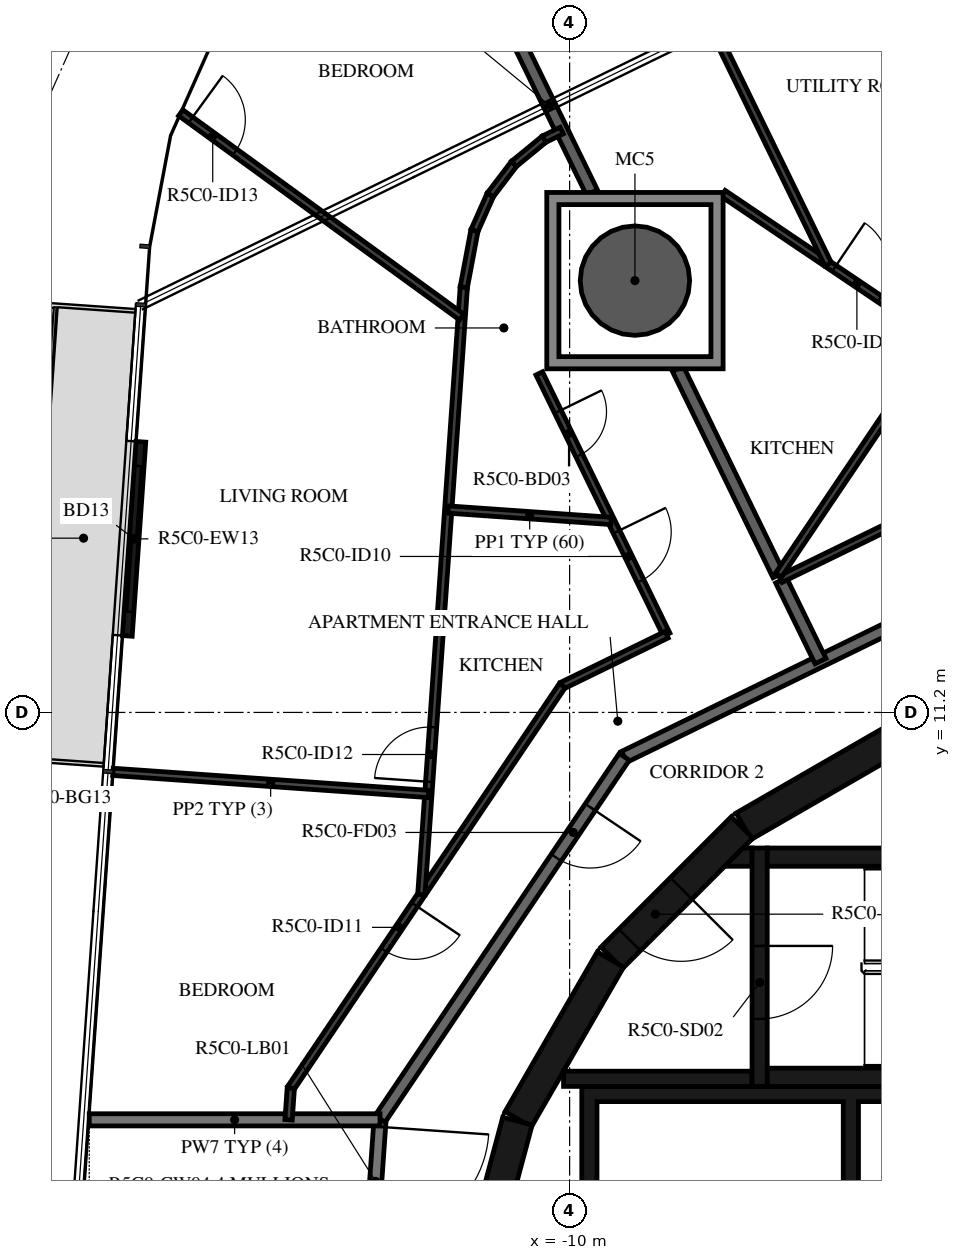
"""IFC4 building model, lengths in metres.
Left out: names, types, materials, properties, quantities, classifications, styles, units other than length and angle.
Written with IfcOpenShell. Run it as: python <this file> out.ifc"""

import sys

from ifc_helpers import new_model, si_unit, direction, frame, frame_2d, origin, origin_2d, place, context, subcontext, project, spatial, polyline, rectangle, hollow_circle, outline, extrude, element, fill, save


model = new_model("IFC4")
c1 = context("Model", 3, precision=1e-05, world=origin(), true_north=direction((0.0, 1.0)))
c2 = subcontext(c1, "Body", "Model", "MODEL_VIEW")
j1 = project(units=[si_unit("LENGTHUNIT", "METRE"), si_unit("PLANEANGLEUNIT", "RADIAN")], contexts=[c1])
p1 = place(None, origin())
s1 = spatial("IfcSite", under=j1, at=p1, CompositionType="ELEMENT")
p2 = place(p1, origin())
s2 = spatial("IfcBuilding", under=s1, at=p2, CompositionType="ELEMENT")
p3 = place(p2, frame((0.0, 0.0, 209.4)))
s3 = spatial("IfcBuildingStorey", under=s2, at=p3, CompositionType="ELEMENT", Elevation=209.4)
p4 = place(p3, frame((-8.926, 18.301, -0.38), z_axis=(0.0, 0.0, 1.0), x_axis=(1.0, 0.0, 0.0)))
e1 = element("IfcColumn", 1, at=p4, inside=s3, PredefinedType="COLUMN", context=c2, shape_type="SweptSolid", body=[
    extrude(hollow_circle(Radius=0.9, WallThickness=0.04, at=origin_2d()), origin(), (0.0, 0.0, 1.0), 3.5),
])
p5 = place(p3, frame((-17.051, 15.65, 0.0), z_axis=(0.0, 0.0, 1.0), x_axis=(-0.069734222855, -0.997565605944, 0.0)))
e2 = element("IfcWall", 2, at=p5, inside=s3, PredefinedType="STANDARD", context=c2, shape_type="SweptSolid", body=[
    extrude(rectangle(XDim=3.2, YDim=0.16, at=frame_2d((1.6, 0.0))), origin(), (0.0, 0.0, 1.0), 3.12),
])
p6 = place(p5, frame((0.4, 0.0, 0.0)))
e3 = element("IfcOpeningElement", 3, at=p6, cuts=e2, PredefinedType="OPENING", context=c2, shape_type="SweptSolid", body=[
    extrude(rectangle(XDim=2.4, YDim=2.4, at=frame_2d((1.2, 1.2))), frame((0.0, 0.09, 0.0), z_axis=(0.0, -1.0, 0.0), x_axis=(1.0, 0.0, 0.0)), (0.0, 0.0, 1.0), 0.18),
])
p7 = place(p3, frame((-4.51, 10.845, 0.0), z_axis=(0.0, 0.0, 1.0), x_axis=(-0.865975092491, -0.500087131594, 0.0)))
e4 = element("IfcWall", 4, at=p7, inside=s3, PredefinedType="SHEAR", context=c2, shape_type="SweptSolid", body=[
    extrude(rectangle(XDim=3.033, YDim=0.5, at=frame_2d((1.516, 0.0))), origin(), (0.0, 0.0, 1.0), 3.12),
])
p8 = place(p3, frame((-7.164, 9.308, 0.0), z_axis=(0.0, 0.0, 1.0), x_axis=(-0.707106781187, -0.707106781187, 0.0)))
e5 = element("IfcWall", 5, at=p8, inside=s3, PredefinedType="SHEAR", context=c2, shape_type="SweptSolid", body=[
    extrude(rectangle(XDim=3.032, YDim=0.5, at=frame_2d((1.516, 0.0))), origin(), (0.0, 0.0, 1.0), 3.12),
])
p9 = place(p8, frame((1.416, 0.0, 0.0)))
e6 = element("IfcOpeningElement", 6, at=p9, cuts=e5, PredefinedType="OPENING", context=c2, shape_type="SweptSolid", body=[
    extrude(rectangle(XDim=1.2, YDim=2.1, at=frame_2d((0.6, 1.05))), frame((0.0, 0.26, 0.0), z_axis=(0.0, -1.0, 0.0), x_axis=(1.0, 0.0, 0.0)), (0.0, 0.0, 1.0), 0.52),
])
for number, where, z_axis, x_axis in (
    (7, (-9.329, 7.137, 0.0), (0.0, 0.0, 1.0), (-0.5, -0.866, 0.0)),
    (8, (-10.858, 4.479, 0.0), (0.0, 0.0, 1.0), (-0.259, -0.966, 0.0)),
):
    element("IfcWall", number, at=place(p3, frame(where, z_axis=z_axis, x_axis=x_axis)), inside=s3, PredefinedType="SHEAR", context=c2, shape_type="SweptSolid", body=[
        extrude(rectangle(XDim=3.033, YDim=0.5, at=frame_2d((1.516, 0.0))), origin(), (0.0, 0.0, 1.0), 3.12),
    ])
for number, where, z_axis, x_axis in (
    (9, (-6.75, 5.2, 0.0), (0.0, 0.0, 1.0), (1.0, 0.0, 0.0)),
    (10, (-6.75, 8.82, 0.0), (0.0, 0.0, 1.0), (1.0, 0.0, 0.0)),
):
    element("IfcWall", number, at=place(p3, frame(where, z_axis=z_axis, x_axis=x_axis)), inside=s3, PredefinedType="SHEAR", context=c2, shape_type="SweptSolid", body=[
        extrude(rectangle(XDim=6.75, YDim=0.3, at=frame_2d((3.375, 0.0))), origin(), (0.0, 0.0, 1.0), 3.12),
    ])
p10 = place(p3, frame((-6.875, 8.97, 0.0), z_axis=(0.0, 0.0, 1.0), x_axis=(0.0, -1.0, 0.0)))
e11 = element("IfcWall", 11, at=p10, inside=s3, PredefinedType="SHEAR", context=c2, shape_type="SweptSolid", body=[
    extrude(rectangle(XDim=3.92, YDim=0.25, at=frame_2d((1.96, 0.0))), origin(), (0.0, 0.0, 1.0), 3.12),
])
p11 = place(p10, frame((1.61, 0.0, 0.0)))
e12 = element("IfcOpeningElement", 12, at=p11, cuts=e11, PredefinedType="OPENING", context=c2, shape_type="SweptSolid", body=[
    extrude(rectangle(XDim=1.2, YDim=2.1, at=frame_2d((0.6, 1.05))), frame((0.0, 0.135, 0.0), z_axis=(0.0, -1.0, 0.0), x_axis=(1.0, 0.0, 0.0)), (0.0, 0.0, 1.0), 0.27),
])
p12 = place(p3, frame((-7.0, 5.175, 0.0), z_axis=(0.0, 0.0, 1.0), x_axis=(-1.0, 0.0, 0.0)))
e13 = element("IfcWall", 13, at=p12, inside=s3, PredefinedType="SHEAR", context=c2, shape_type="SweptSolid", body=[
    extrude(rectangle(XDim=3.1, YDim=0.25, at=frame_2d((1.55, 0.0))), origin(), (0.0, 0.0, 1.0), 3.12),
])
p13 = place(p3, origin())
e14 = element("IfcWall", 14, at=p13, inside=s3, PredefinedType="SHEAR", context=c2, shape_type="SweptSolid", body=[
    extrude(outline(polyline([(-7.148, 8.97), (-7.0, 8.97), (-7.0, 8.67), (-7.448, 8.67), (-7.148, 8.97)])), origin(), (0.0, 0.0, 1.0), 3.12),
])
p14 = place(p3, origin())
e15 = element("IfcWall", 15, at=p14, inside=s3, PredefinedType="SHEAR", context=c2, shape_type="SweptSolid", body=[
    extrude(outline(polyline([(-9.55, 4.8), (-5.5, 4.8), (-5.5, 1.9), (-5.25, 1.9), (-5.25, 4.8), (-1.2, 4.8), (-1.2, 1.9), (-0.95, 1.9), (-0.95, 4.8), (0.95, 4.8), (0.95, 1.9), (1.2, 1.9), (1.2, 4.8), (3.1, 4.8), (3.1, 1.9), (3.35, 1.9), (3.35, 4.8), (5.25, 4.8), (5.25, 1.9), (5.5, 1.9), (5.5, 4.8), (7.4, 4.8), (7.4, 1.9), (7.65, 1.9), (7.65, 4.8), (9.55, 4.8), (9.55, 1.9), (9.8, 1.9), (9.8, 4.8), (9.8, 5.05), (-9.8, 5.05), (-9.8, 4.8), (-9.8, 1.9), (-9.55, 1.9), (-9.55, 4.8)])), origin(), (0.0, 0.0, 1.0), 3.12),
])
p15 = place(p3, frame((-13.118, 4.5, 0.0), z_axis=(0.0, 0.0, 1.0), x_axis=(-0.069746872611, -0.99756472159, 0.0)))
e16 = element("IfcWall", 16, at=p15, inside=s3, PredefinedType="STANDARD", context=c2, shape_type="SweptSolid", body=[
    extrude(rectangle(XDim=3.574, YDim=0.2, at=frame_2d((1.787, 0.0))), origin(), (0.0, 0.0, 1.0), 3.12),
])
p16 = place(p15, frame((0.115, 0.0, 0.0)))
e17 = element("IfcOpeningElement", 17, at=p16, cuts=e16, PredefinedType="OPENING", context=c2, shape_type="SweptSolid", body=[
    extrude(rectangle(XDim=1.8, YDim=2.1, at=frame_2d((0.9, 1.05))), frame((0.0, 0.11, 0.0), z_axis=(0.0, -1.0, 0.0), x_axis=(1.0, 0.0, 0.0)), (0.0, 0.0, 1.0), 0.22),
])
p17 = place(p3, frame((-2.647, 13.618, 0.0), z_axis=(0.0, 0.0, 1.0), x_axis=(-0.898796543751, -0.438366026218, 0.0)))
e18 = element("IfcWall", 18, at=p17, inside=s3, PredefinedType="STANDARD", context=c2, shape_type="SweptSolid", body=[
    extrude(rectangle(XDim=7.181, YDim=0.2, at=frame_2d((3.591, 0.0))), origin(), (0.0, 0.0, 1.0), 3.12),
])
p18 = place(p3, frame((-9.101, 10.47, 0.0), z_axis=(0.0, 0.0, 1.0), x_axis=(-0.559195469534, -0.829035841718, 0.0)))
e19 = element("IfcWall", 19, at=p18, inside=s3, PredefinedType="STANDARD", context=c2, shape_type="SweptSolid", body=[
    extrude(rectangle(XDim=7.181, YDim=0.2, at=frame_2d((3.591, 0.0))), origin(), (0.0, 0.0, 1.0), 3.12),
])
p19 = place(p18, frame((1.0, 0.0, 0.0)))
e20 = element("IfcOpeningElement", 20, at=p19, cuts=e19, PredefinedType="OPENING", context=c2, shape_type="SweptSolid", body=[
    extrude(rectangle(XDim=1.0, YDim=2.1, at=frame_2d((0.5, 1.05))), frame((0.0, 0.11, 0.0), z_axis=(0.0, -1.0, 0.0), x_axis=(1.0, 0.0, 0.0)), (0.0, 0.0, 1.0), 0.22),
])
p20 = place(p3, frame((-13.118, 4.5, 0.0), z_axis=(0.0, 0.0, 1.0), x_axis=(-1.0, 0.0, 0.0)))
e21 = element("IfcWall", 21, at=p20, inside=s3, PredefinedType="STANDARD", context=c2, shape_type="SweptSolid", body=[
    extrude(rectangle(XDim=4.782, YDim=0.2, at=frame_2d((2.391, 0.0))), origin(), (0.0, 0.0, 1.0), 3.12),
])
p21 = place(p3, frame((-6.522, 13.373, 0.0), z_axis=(0.0, 0.0, 1.0), x_axis=(0.438277270821, -0.8988398266, 0.0)))
e22 = element("IfcWall", 22, at=p21, inside=s3, PredefinedType="STANDARD", context=c2, shape_type="SweptSolid", body=[
    extrude(rectangle(XDim=1.479, YDim=0.2, at=frame_2d((0.74, 0.0))), origin(), (0.0, 0.0, 1.0), 3.12),
])
p22 = place(p3, frame((-8.219, 16.851, 0.0), z_axis=(0.0, 0.0, 1.0), x_axis=(0.438291091101, -0.898833087654, 0.0)))
e23 = element("IfcWall", 23, at=p22, inside=s3, PredefinedType="STANDARD", context=c2, shape_type="SweptSolid", body=[
    extrude(rectangle(XDim=3.774, YDim=0.2, at=frame_2d((1.887, 0.0))), origin(), (0.0, 0.0, 1.0), 3.12),
])
p23 = place(p3, frame((-12.409, 25.442, 0.0), z_axis=(0.0, 0.0, 1.0), x_axis=(0.43838641251, -0.898786600549, 0.0)))
e24 = element("IfcWall", 24, at=p23, inside=s3, PredefinedType="STANDARD", context=c2, shape_type="SweptSolid", body=[
    extrude(rectangle(XDim=6.333, YDim=0.2, at=frame_2d((3.166, 0.0))), origin(), (0.0, 0.0, 1.0), 3.12),
])
p24 = place(p3, frame((-2.943, 15.142, 0.0), z_axis=(0.0, 0.0, 1.0), x_axis=(-0.89881075705, -0.438336883014, 0.0)))
e25 = element("IfcWall", 25, at=p24, inside=s3, PredefinedType="PARTITIONING", context=c2, shape_type="SweptSolid", body=[
    extrude(rectangle(XDim=3.992, YDim=0.12, at=frame_2d((1.996, 0.0))), origin(), (0.0, 0.0, 1.0), 3.12),
])
p25 = place(p3, frame((-7.476, 19.735, 0.0), z_axis=(0.0, 0.0, 1.0), x_axis=(0.829035412992, -0.559196105142, 0.0)))
e26 = element("IfcWall", 26, at=p25, inside=s3, PredefinedType="PARTITIONING", context=c2, shape_type="SweptSolid", body=[
    extrude(rectangle(XDim=8.531, YDim=0.12, at=frame_2d((4.266, 0.0))), origin(), (0.0, 0.0, 1.0), 3.12),
])
p26 = place(p25, frame((2.204, 0.0, 0.0)))
e27 = element("IfcOpeningElement", 27, at=p26, cuts=e26, PredefinedType="OPENING", context=c2, shape_type="SweptSolid", body=[
    extrude(rectangle(XDim=0.9, YDim=2.1, at=frame_2d((0.45, 1.05))), frame((0.0, 0.07, 0.0), z_axis=(0.0, -1.0, 0.0), x_axis=(1.0, 0.0, 0.0)), (0.0, 0.0, 1.0), 0.14),
])
p27 = place(p3, frame((-3.939, 17.35, 0.0), z_axis=(0.0, 0.0, 1.0), x_axis=(-0.559193216274, -0.829037361566, 0.0)))
e28 = element("IfcWall", 28, at=p27, inside=s3, PredefinedType="PARTITIONING", context=c2, shape_type="SweptSolid", body=[
    extrude(rectangle(XDim=4.694, YDim=0.12, at=frame_2d((2.347, 0.0))), origin(), (0.0, 0.0, 1.0), 3.12),
])
p28 = place(p3, frame((-9.496, 26.254, 0.0), z_axis=(0.0, 0.0, 1.0), x_axis=(0.438361739807, -0.89879863433, 0.0)))
e29 = element("IfcWall", 29, at=p28, inside=s3, PredefinedType="PARTITIONING", context=c2, shape_type="SweptSolid", body=[
    extrude(rectangle(XDim=8.549, YDim=0.12, at=frame_2d((4.274, 0.0))), origin(), (0.0, 0.0, 1.0), 3.12),
])
p29 = place(p28, frame((0.4, 0.0, 0.0)))
e30 = element("IfcOpeningElement", 30, at=p29, cuts=e29, PredefinedType="OPENING", context=c2, shape_type="SweptSolid", body=[
    extrude(rectangle(XDim=0.9, YDim=2.1, at=frame_2d((0.45, 1.05))), frame((0.0, 0.07, 0.0), z_axis=(0.0, -1.0, 0.0), x_axis=(1.0, 0.0, 0.0)), (0.0, 0.0, 1.0), 0.14),
])
p30 = place(p3, frame((-10.5, 16.775, 0.0), z_axis=(0.0, 0.0, 1.0), x_axis=(0.438345136783, -0.898806731761, 0.0)))
e31 = element("IfcWall", 31, at=p30, inside=s3, PredefinedType="PARTITIONING", context=c2, shape_type="SweptSolid", body=[
    extrude(rectangle(XDim=4.78, YDim=0.12, at=frame_2d((2.39, 0.0))), origin(), (0.0, 0.0, 1.0), 3.12),
])
p31 = place(p30, frame((0.7, 0.0, 0.0)))
e32 = element("IfcOpeningElement", 32, at=p31, cuts=e31, PredefinedType="OPENING", context=c2, shape_type="SweptSolid", body=[
    extrude(rectangle(XDim=0.8, YDim=2.1, at=frame_2d((0.4, 1.05))), frame((0.0, 0.07, 0.0), z_axis=(0.0, -1.0, 0.0), x_axis=(1.0, 0.0, 0.0)), (0.0, 0.0, 1.0), 0.14),
])
p32 = place(p30, frame((2.899, 0.0, 0.0)))
e33 = element("IfcOpeningElement", 33, at=p32, cuts=e31, PredefinedType="OPENING", context=c2, shape_type="SweptSolid", body=[
    extrude(rectangle(XDim=0.9, YDim=2.1, at=frame_2d((0.45, 1.05))), frame((0.0, 0.07, 0.0), z_axis=(0.0, -1.0, 0.0), x_axis=(1.0, 0.0, 0.0)), (0.0, 0.0, 1.0), 0.14),
])
p33 = place(p3, frame((-8.405, 12.479, 0.0), z_axis=(0.0, 0.0, 1.0), x_axis=(-0.898784427692, -0.438390867307, 0.0)))
e34 = element("IfcWall", 34, at=p33, inside=s3, PredefinedType="PARTITIONING", context=c2, shape_type="SweptSolid", body=[
    extrude(rectangle(XDim=1.908, YDim=0.12, at=frame_2d((0.954, 0.0))), origin(), (0.0, 0.0, 1.0), 3.12),
])
p34 = place(p3, frame((-10.12, 11.642, 0.0), z_axis=(0.0, 0.0, 1.0), x_axis=(-0.55920080659, -0.829032241779, 0.0)))
e35 = element("IfcWall", 35, at=p34, inside=s3, PredefinedType="PARTITIONING", context=c2, shape_type="SweptSolid", body=[
    extrude(rectangle(XDim=7.985, YDim=0.12, at=frame_2d((3.992, 0.0))), origin(), (0.0, 0.0, 1.0), 3.12),
])
p35 = place(p34, frame((4.346, 0.0, 0.0)))
e36 = element("IfcOpeningElement", 36, at=p35, cuts=e35, PredefinedType="OPENING", context=c2, shape_type="SweptSolid", body=[
    extrude(rectangle(XDim=0.9, YDim=2.1, at=frame_2d((0.45, 1.05))), frame((0.0, 0.07, 0.0), z_axis=(0.0, -1.0, 0.0), x_axis=(1.0, 0.0, 0.0)), (0.0, 0.0, 1.0), 0.14),
])
p36 = place(p3, frame((-14.585, 5.022, 0.0), z_axis=(0.0, 0.0, 1.0), x_axis=(-0.069490327804, -0.997582625321, 0.0)))
e37 = element("IfcWall", 37, at=p36, inside=s3, PredefinedType="PARTITIONING", context=c2, shape_type="SweptSolid", body=[
    extrude(rectangle(XDim=0.523, YDim=0.12, at=frame_2d((0.262, 0.0))), origin(), (0.0, 0.0, 1.0), 3.12),
])
p37 = place(p3, frame((-12.439, 8.204, 0.0), z_axis=(0.0, 0.0, 1.0), x_axis=(0.069750037523, 0.997564500303, 0.0)))
e38 = element("IfcWall", 38, at=p37, inside=s3, PredefinedType="PARTITIONING", context=c2, shape_type="SweptSolid", body=[
    extrude(rectangle(XDim=10.014, YDim=0.12, at=frame_2d((5.007, 0.0))), origin(), (0.0, 0.0, 1.0), 3.12),
])
p38 = place(p37, frame((1.859, 0.0, 0.0)))
e39 = element("IfcOpeningElement", 39, at=p38, cuts=e38, PredefinedType="OPENING", context=c2, shape_type="SweptSolid", body=[
    extrude(rectangle(XDim=0.9, YDim=2.1, at=frame_2d((0.45, 1.05))), frame((0.0, 0.07, 0.0), z_axis=(0.0, -1.0, 0.0), x_axis=(1.0, 0.0, 0.0)), (0.0, 0.0, 1.0), 0.14),
])
p39 = place(p3, frame((-11.74, 18.194, 0.0), z_axis=(0.0, 0.0, 1.0), x_axis=(0.185144760846, 0.982711258474, 0.0)))
e40 = element("IfcWall", 40, at=p39, inside=s3, PredefinedType="PARTITIONING", context=c2, shape_type="SweptSolid", body=[
    extrude(rectangle(XDim=0.947, YDim=0.12, at=frame_2d((0.473, 0.0))), origin(), (0.0, 0.0, 1.0), 3.12),
])
for number, where, z_axis, x_axis in (
    (41, (-11.565, 19.125, 0.0), (0.0, 0.0, 1.0), (0.407, 0.914, 0.0)),
    (42, (-11.304, 19.711, 0.0), (0.0, 0.0, 1.0), (0.607, 0.795, 0.0)),
    (43, (-10.915, 20.221, 0.0), (0.0, 0.0, 1.0), (0.773, 0.634, 0.0)),
):
    element("IfcWall", number, at=place(p3, frame(where, z_axis=z_axis, x_axis=x_axis)), inside=s3, PredefinedType="PARTITIONING", context=c2, shape_type="SweptSolid", body=[
        extrude(rectangle(XDim=0.642, YDim=0.12, at=frame_2d((0.321, 0.0))), origin(), (0.0, 0.0, 1.0), 3.12),
    ])
p40 = place(p3, frame((-10.418, 20.628, 0.0), z_axis=(0.0, 0.0, 1.0), x_axis=(0.898943795765, 0.438063981692, 0.0)))
e44 = element("IfcWall", 44, at=p40, inside=s3, PredefinedType="PARTITIONING", context=c2, shape_type="SweptSolid", body=[
    extrude(rectangle(XDim=0.321, YDim=0.12, at=frame_2d((0.161, 0.0))), origin(), (0.0, 0.0, 1.0), 3.12),
])
p41 = place(p3, frame((-16.395, 21.061, 0.0), z_axis=(0.0, 0.0, 1.0), x_axis=(0.808810002497, -0.58807004673, 0.0)))
e45 = element("IfcWall", 45, at=p41, inside=s3, PredefinedType="PARTITIONING", context=c2, shape_type="SweptSolid", body=[
    extrude(rectangle(XDim=5.713, YDim=0.12, at=frame_2d((2.856, 0.0))), origin(), (0.0, 0.0, 1.0), 3.12),
])
p42 = place(p41, frame((0.2, 0.0, 0.0)))
e46 = element("IfcOpeningElement", 46, at=p42, cuts=e45, PredefinedType="OPENING", context=c2, shape_type="SweptSolid", body=[
    extrude(rectangle(XDim=0.9, YDim=2.1, at=frame_2d((0.45, 1.05))), frame((0.0, 0.07, 0.0), z_axis=(0.0, -1.0, 0.0), x_axis=(1.0, 0.0, 0.0)), (0.0, 0.0, 1.0), 0.14),
])
p43 = place(p3, frame((-11.996, 14.536, 0.0), z_axis=(0.0, 0.0, 1.0), x_axis=(0.997565991425, -0.069728708231, 0.0)))
e47 = element("IfcWall", 47, at=p43, inside=s3, PredefinedType="PARTITIONING", context=c2, shape_type="SweptSolid", body=[
    extrude(rectangle(XDim=2.686, YDim=0.12, at=frame_2d((1.343, 0.0))), origin(), (0.0, 0.0, 1.0), 3.12),
])
p44 = place(p3, frame((-17.51, 10.222, 0.0), z_axis=(0.0, 0.0, 1.0), x_axis=(0.997563184303, -0.069768856397, 0.0)))
e48 = element("IfcWall", 48, at=p44, inside=s3, PredefinedType="PARTITIONING", context=c2, shape_type="SweptSolid", body=[
    extrude(rectangle(XDim=5.2, YDim=0.12, at=frame_2d((2.6, 0.0))), origin(), (0.0, 0.0, 1.0), 2.73),
])
p45 = place(p3, origin())
e49 = element("IfcWall", 49, at=p45, inside=s3, PredefinedType="STANDARD", context=c2, shape_type="SweptSolid", body=[
    extrude(outline(polyline([(-7.476, 19.751), (-7.476, 16.851), (-10.376, 16.851), (-10.376, 19.751), (-7.476, 19.751)]), holes=[polyline([(-10.176, 17.051), (-7.676, 17.051), (-7.676, 19.551), (-10.176, 19.551), (-10.176, 17.051)])]), origin(), (0.0, 0.0, 1.0), 3.12),
])
p46 = place(p6, origin())
e50 = element("IfcDoor", 50, at=p46, inside=s3, OperationType="DOUBLE_DOOR_SLIDING", PredefinedType="DOOR", context=c2, shape_type="SweptSolid", body=[
    extrude(rectangle(XDim=2.4, YDim=2.4, at=frame_2d((1.2, 1.2))), frame((0.0, 0.025, 0.0), z_axis=(0.0, -1.0, 0.0), x_axis=(1.0, 0.0, 0.0)), (0.0, 0.0, 1.0), 0.05),
])
fill(e3, e50)
p47 = place(p11, origin())
e51 = element("IfcDoor", 51, at=p47, inside=s3, OperationType="SINGLE_SWING_LEFT", PredefinedType="DOOR", context=c2, shape_type="SweptSolid", body=[
    extrude(rectangle(XDim=1.2, YDim=2.1, at=frame_2d((0.6, 1.05))), frame((0.0, 0.025, 0.0), z_axis=(0.0, -1.0, 0.0), x_axis=(1.0, 0.0, 0.0)), (0.0, 0.0, 1.0), 0.05),
])
fill(e12, e51)
p48 = place(p9, origin())
e52 = element("IfcDoor", 52, at=p48, inside=s3, OperationType="SINGLE_SWING_RIGHT", PredefinedType="DOOR", context=c2, shape_type="SweptSolid", body=[
    extrude(rectangle(XDim=1.2, YDim=2.1, at=frame_2d((0.6, 1.05))), frame((0.0, 0.025, 0.0), z_axis=(0.0, -1.0, 0.0), x_axis=(1.0, 0.0, 0.0)), (0.0, 0.0, 1.0), 0.05),
])
fill(e6, e52)
p49 = place(p26, origin())
e53 = element("IfcDoor", 53, at=p49, inside=s3, OperationType="SINGLE_SWING_LEFT", PredefinedType="DOOR", context=c2, shape_type="SweptSolid", body=[
    extrude(rectangle(XDim=0.9, YDim=2.1, at=frame_2d((0.45, 1.05))), frame((0.0, 0.025, 0.0), z_axis=(0.0, -1.0, 0.0), x_axis=(1.0, 0.0, 0.0)), (0.0, 0.0, 1.0), 0.05),
])
fill(e27, e53)
p50 = place(p19, origin())
e54 = element("IfcDoor", 54, at=p50, inside=s3, OperationType="SINGLE_SWING_LEFT", PredefinedType="DOOR", context=c2, shape_type="SweptSolid", body=[
    extrude(rectangle(XDim=1.0, YDim=2.1, at=frame_2d((0.5, 1.05))), frame((0.0, 0.025, 0.0), z_axis=(0.0, -1.0, 0.0), x_axis=(1.0, 0.0, 0.0)), (0.0, 0.0, 1.0), 0.05),
])
fill(e20, e54)
p51 = place(p31, origin())
e55 = element("IfcDoor", 55, at=p51, inside=s3, OperationType="SINGLE_SWING_LEFT", PredefinedType="DOOR", context=c2, shape_type="SweptSolid", body=[
    extrude(rectangle(XDim=0.8, YDim=2.1, at=frame_2d((0.4, 1.05))), frame((0.0, 0.025, 0.0), z_axis=(0.0, -1.0, 0.0), x_axis=(1.0, 0.0, 0.0)), (0.0, 0.0, 1.0), 0.05),
])
fill(e32, e55)
p52 = place(p32, origin())
e56 = element("IfcDoor", 56, at=p52, inside=s3, OperationType="SINGLE_SWING_LEFT", PredefinedType="DOOR", context=c2, shape_type="SweptSolid", body=[
    extrude(rectangle(XDim=0.9, YDim=2.1, at=frame_2d((0.45, 1.05))), frame((0.0, 0.025, 0.0), z_axis=(0.0, -1.0, 0.0), x_axis=(1.0, 0.0, 0.0)), (0.0, 0.0, 1.0), 0.05),
])
fill(e33, e56)
p53 = place(p35, origin())
e57 = element("IfcDoor", 57, at=p53, inside=s3, OperationType="SINGLE_SWING_LEFT", PredefinedType="DOOR", context=c2, shape_type="SweptSolid", body=[
    extrude(rectangle(XDim=0.9, YDim=2.1, at=frame_2d((0.45, 1.05))), frame((0.0, 0.025, 0.0), z_axis=(0.0, -1.0, 0.0), x_axis=(1.0, 0.0, 0.0)), (0.0, 0.0, 1.0), 0.05),
])
fill(e36, e57)
p54 = place(p38, origin())
e58 = element("IfcDoor", 58, at=p54, inside=s3, OperationType="SINGLE_SWING_LEFT", PredefinedType="DOOR", context=c2, shape_type="SweptSolid", body=[
    extrude(rectangle(XDim=0.9, YDim=2.1, at=frame_2d((0.45, 1.05))), frame((0.0, 0.025, 0.0), z_axis=(0.0, -1.0, 0.0), x_axis=(1.0, 0.0, 0.0)), (0.0, 0.0, 1.0), 0.05),
])
fill(e39, e58)
p55 = place(p42, origin())
e59 = element("IfcDoor", 59, at=p55, inside=s3, OperationType="SINGLE_SWING_LEFT", PredefinedType="DOOR", context=c2, shape_type="SweptSolid", body=[
    extrude(rectangle(XDim=0.9, YDim=2.1, at=frame_2d((0.45, 1.05))), frame((0.0, 0.025, 0.0), z_axis=(0.0, -1.0, 0.0), x_axis=(1.0, 0.0, 0.0)), (0.0, 0.0, 1.0), 0.05),
])
fill(e46, e59)
p56 = place(p16, origin())
e60 = element("IfcDoor", 60, at=p56, inside=s3, OperationType="DOUBLE_DOOR_SINGLE_SWING", PredefinedType="DOOR", context=c2, shape_type="SweptSolid", body=[
    extrude(rectangle(XDim=1.8, YDim=2.1, at=frame_2d((0.9, 1.05))), frame((0.0, 0.025, 0.0), z_axis=(0.0, -1.0, 0.0), x_axis=(1.0, 0.0, 0.0)), (0.0, 0.0, 1.0), 0.05),
])
fill(e17, e60)
save(model, sys.argv[1])
